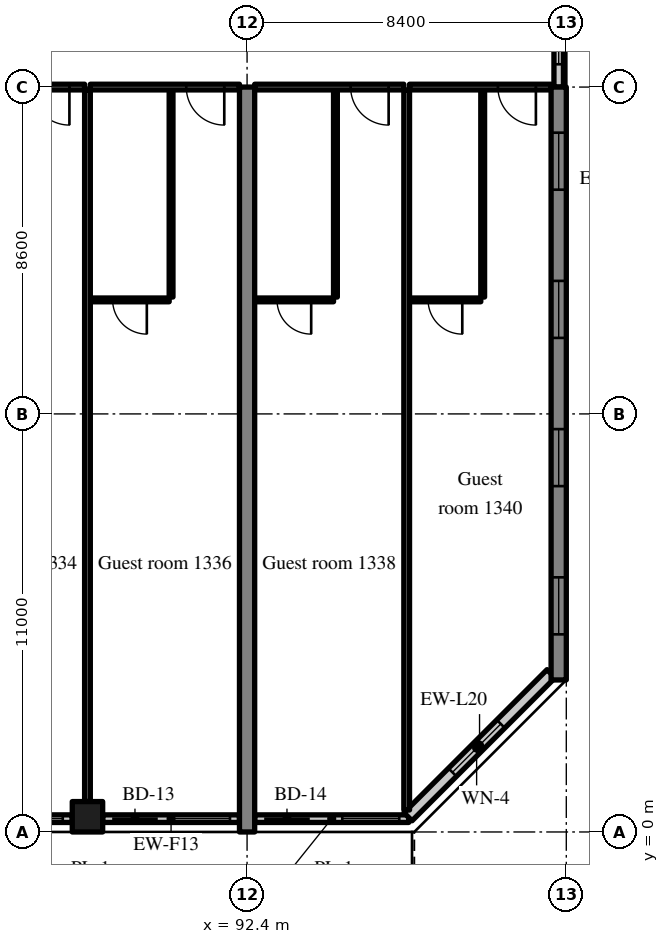
"""IFC4 building model, lengths in metres.
Left out: names, types, materials, properties, quantities, classifications, styles, units other than length and angle.
Written with IfcOpenShell. Run it as: python <this file> out.ifc"""

import sys

from ifc_helpers import new_model, si_unit, direction, frame, frame_2d, origin, origin_2d, place, context, subcontext, project, spatial, rectangle, extrude, source, transform, mapped, element, fill, save


model = new_model("IFC4")
c1 = context("Model", 3, precision=1e-05, world=origin(), true_north=direction((0.0, 1.0)))
c2 = subcontext(c1, "Body", "Model", "MODEL_VIEW")
j1 = project(units=[si_unit("LENGTHUNIT", "METRE"), si_unit("PLANEANGLEUNIT", "RADIAN")], contexts=[c1])
p1 = place(None, origin())
s1 = spatial("IfcSite", under=j1, at=p1, CompositionType="ELEMENT")
p2 = place(p1, origin())
s2 = spatial("IfcBuilding", under=s1, at=p2, CompositionType="ELEMENT")
p3 = place(p2, frame((0.0, 0.0, 58.2)))
s3 = spatial("IfcBuildingStorey", under=s2, at=p3, CompositionType="ELEMENT", Elevation=58.2)
m1 = source(origin(), c2, "Body", "SweptSolid", [
    extrude(rectangle(XDim=19.6, YDim=0.4, at=frame_2d((9.8, 0.0))), origin(), (0.0, 0.0, 1.0), 3.52),
])
p4 = place(p3, frame((92.4, 0.0, 0.0), z_axis=(0.0, 0.0, 1.0), x_axis=(0.0, 1.0, 0.0)))
e1 = element("IfcWall", 1, at=p4, inside=s3, PredefinedType="SHEAR", context=c2, shape_type="MappedRepresentation", body=[
    mapped(m1, transform((0.0, 0.0, 0.0), scale=1.0)),
])
m2 = source(origin(), c2, "Body", "SweptSolid", [
    extrude(rectangle(XDim=15.6, YDim=0.4, at=frame_2d((7.8, 0.0))), origin(), (0.0, 0.0, 1.0), 3.52),
])
p5 = place(p3, frame((100.6, 4.0, 0.0), z_axis=(0.0, 0.0, 1.0), x_axis=(0.0, 1.0, 0.0)))
e2 = element("IfcWall", 2, at=p5, inside=s3, PredefinedType="SHEAR", context=c2, shape_type="MappedRepresentation", body=[
    mapped(m2, transform((0.0, 0.0, 0.0), scale=1.0)),
])
m3 = source(origin(), c2, "Body", "SweptSolid", [
    extrude(rectangle(XDim=1.5, YDim=1.5, at=frame_2d((0.75, 0.75))), frame((0.0, 0.21, 0.0), z_axis=(0.0, -1.0, 0.0), x_axis=(1.0, 0.0, 0.0)), (0.0, 0.0, 1.0), 0.42),
])
p6 = place(p5, frame((1.2, 0.0, 0.9)))
e3 = element("IfcOpeningElement", 3, at=p6, cuts=e2, PredefinedType="OPENING", context=c2, shape_type="MappedRepresentation", body=[
    mapped(m3, transform((0.0, 0.0, 0.0), scale=1.0)),
])
p7 = place(p5, frame((5.1, 0.0, 0.9)))
e4 = element("IfcOpeningElement", 4, at=p7, cuts=e2, PredefinedType="OPENING", context=c2, shape_type="MappedRepresentation", body=[
    mapped(m3, transform((0.0, 0.0, 0.0), scale=1.0)),
])
p8 = place(p5, frame((9.0, 0.0, 0.9)))
e5 = element("IfcOpeningElement", 5, at=p8, cuts=e2, PredefinedType="OPENING", context=c2, shape_type="MappedRepresentation", body=[
    mapped(m3, transform((0.0, 0.0, 0.0), scale=1.0)),
])
p9 = place(p5, frame((12.9, 0.0, 0.9)))
e6 = element("IfcOpeningElement", 6, at=p9, cuts=e2, PredefinedType="OPENING", context=c2, shape_type="MappedRepresentation", body=[
    mapped(m3, transform((0.0, 0.0, 0.0), scale=1.0)),
])
m4 = source(origin(), c2, "Body", "SweptSolid", [
    extrude(rectangle(XDim=0.8, YDim=0.8, at=origin_2d()), origin(), (0.0, 0.0, 1.0), 3.52),
])
p10 = place(p3, frame((88.2, 0.4, 0.0), z_axis=(0.0, 0.0, 1.0), x_axis=(1.0, 0.0, 0.0)))
e7 = element("IfcColumn", 7, at=p10, inside=s3, PredefinedType="COLUMN", context=c2, shape_type="MappedRepresentation", body=[
    mapped(m4, transform((0.0, 0.0, 0.0), scale=1.0)),
])
m5 = source(origin(), c2, "Body", "SweptSolid", [
    extrude(rectangle(XDim=3.6, YDim=0.2, at=frame_2d((1.8, 0.0))), origin(), (0.0, 0.0, 1.0), 2.82),
])
p11 = place(p3, frame((84.2, 0.35, 0.0), z_axis=(0.0, 0.0, 1.0), x_axis=(1.0, 0.0, 0.0)))
e8 = element("IfcWall", 8, at=p11, inside=s3, PredefinedType="SOLIDWALL", context=c2, shape_type="MappedRepresentation", body=[
    mapped(m5, transform((0.0, 0.0, 0.0), scale=1.0)),
])
m6 = source(origin(), c2, "Body", "SweptSolid", [
    extrude(rectangle(XDim=1.2, YDim=2.4, at=frame_2d((0.6, 1.2))), frame((0.0, 0.11, 0.0), z_axis=(0.0, -1.0, 0.0), x_axis=(1.0, 0.0, 0.0)), (0.0, 0.0, 1.0), 0.22),
])
p12 = place(p11, frame((0.25, 0.0, 0.0)))
e9 = element("IfcOpeningElement", 9, at=p12, cuts=e8, PredefinedType="OPENING", context=c2, shape_type="MappedRepresentation", body=[
    mapped(m6, transform((0.0, 0.0, 0.0), scale=1.0)),
])
m7 = source(origin(), c2, "Body", "SweptSolid", [
    extrude(rectangle(XDim=1.5, YDim=1.5, at=frame_2d((0.75, 0.75))), frame((0.0, 0.11, 0.0), z_axis=(0.0, -1.0, 0.0), x_axis=(1.0, 0.0, 0.0)), (0.0, 0.0, 1.0), 0.22),
])
p13 = place(p11, frame((1.85, 0.0, 0.9)))
e10 = element("IfcOpeningElement", 10, at=p13, cuts=e8, PredefinedType="OPENING", context=c2, shape_type="MappedRepresentation", body=[
    mapped(m7, transform((0.0, 0.0, 0.0), scale=1.0)),
])
m8 = source(origin(), c2, "Body", "SweptSolid", [
    extrude(rectangle(XDim=3.6, YDim=0.2, at=frame_2d((1.8, 0.0))), origin(), (0.0, 0.0, 1.0), 2.82),
])
p14 = place(p3, frame((88.6, 0.35, 0.0), z_axis=(0.0, 0.0, 1.0), x_axis=(1.0, 0.0, 0.0)))
e11 = element("IfcWall", 11, at=p14, inside=s3, PredefinedType="SOLIDWALL", context=c2, shape_type="MappedRepresentation", body=[
    mapped(m8, transform((0.0, 0.0, 0.0), scale=1.0)),
])
p15 = place(p14, frame((0.25, 0.0, 0.0)))
e12 = element("IfcOpeningElement", 12, at=p15, cuts=e11, PredefinedType="OPENING", context=c2, shape_type="MappedRepresentation", body=[
    mapped(m6, transform((0.0, 0.0, 0.0), scale=1.0)),
])
p16 = place(p14, frame((1.85, 0.0, 0.9)))
e13 = element("IfcOpeningElement", 13, at=p16, cuts=e11, PredefinedType="OPENING", context=c2, shape_type="MappedRepresentation", body=[
    mapped(m7, transform((0.0, 0.0, 0.0), scale=1.0)),
])
m9 = source(origin(), c2, "Body", "SweptSolid", [
    extrude(rectangle(XDim=4.055, YDim=0.2, at=frame_2d((2.027, 0.0))), origin(), (0.0, 0.0, 1.0), 2.82),
])
p17 = place(p3, frame((92.6, 0.35, 0.0), z_axis=(0.0, 0.0, 1.0), x_axis=(1.0, 0.0, 0.0)))
e14 = element("IfcWall", 14, at=p17, inside=s3, PredefinedType="SOLIDWALL", context=c2, shape_type="MappedRepresentation", body=[
    mapped(m9, transform((0.0, 0.0, 0.0), scale=1.0)),
])
p18 = place(p17, frame((0.25, 0.0, 0.0)))
e15 = element("IfcOpeningElement", 15, at=p18, cuts=e14, PredefinedType="OPENING", context=c2, shape_type="MappedRepresentation", body=[
    mapped(m6, transform((0.0, 0.0, 0.0), scale=1.0)),
])
p19 = place(p17, frame((2.305, 0.0, 0.9)))
e16 = element("IfcOpeningElement", 16, at=p19, cuts=e14, PredefinedType="OPENING", context=c2, shape_type="MappedRepresentation", body=[
    mapped(m7, transform((0.0, 0.0, 0.0), scale=1.0)),
])
m10 = source(origin(), c2, "Body", "SweptSolid", [
    extrude(rectangle(XDim=5.326, YDim=0.3, at=frame_2d((2.663, 0.0))), origin(), (0.0, 0.0, 1.0), 3.52),
])
p20 = place(p3, frame((96.634, 0.4, 0.0), z_axis=(0.0, 0.0, 1.0), x_axis=(0.707083859269, 0.707129702361, 0.0)))
e17 = element("IfcWall", 17, at=p20, inside=s3, PredefinedType="SOLIDWALL", context=c2, shape_type="MappedRepresentation", body=[
    mapped(m10, transform((0.0, 0.0, 0.0), scale=1.0)),
])
m11 = source(origin(), c2, "Body", "SweptSolid", [
    extrude(rectangle(XDim=1.8, YDim=1.5, at=frame_2d((0.9, 0.75))), frame((0.0, 0.16, 0.0), z_axis=(0.0, -1.0, 0.0), x_axis=(1.0, 0.0, 0.0)), (0.0, 0.0, 1.0), 0.32),
])
p21 = place(p20, frame((1.654, 0.0, 0.9)))
e18 = element("IfcOpeningElement", 18, at=p21, cuts=e17, PredefinedType="OPENING", context=c2, shape_type="MappedRepresentation", body=[
    mapped(m11, transform((0.0, 0.0, 0.0), scale=1.0)),
])
m12 = source(origin(), c2, "Body", "SweptSolid", [
    extrude(rectangle(XDim=2.4, YDim=0.25, at=frame_2d((1.2, 0.0))), origin(), (0.0, 0.0, 1.0), 2.62),
])
p22 = place(p3, frame((100.6, 19.6, 0.0), z_axis=(0.0, 0.0, 1.0), x_axis=(0.0, 1.0, 0.0)))
e19 = element("IfcWall", 19, at=p22, inside=s3, PredefinedType="SOLIDWALL", context=c2, shape_type="MappedRepresentation", body=[
    mapped(m12, transform((0.0, 0.0, 0.0), scale=1.0)),
])
m13 = source(origin(), c2, "Body", "SweptSolid", [
    extrude(rectangle(XDim=1.2, YDim=1.5, at=frame_2d((0.6, 0.75))), frame((0.0, 0.135, 0.0), z_axis=(0.0, -1.0, 0.0), x_axis=(1.0, 0.0, 0.0)), (0.0, 0.0, 1.0), 0.27),
])
p23 = place(p22, frame((0.6, 0.0, 0.9)))
e20 = element("IfcOpeningElement", 20, at=p23, cuts=e19, PredefinedType="OPENING", context=c2, shape_type="MappedRepresentation", body=[
    mapped(m13, transform((0.0, 0.0, 0.0), scale=1.0)),
])
m14 = source(origin(), c2, "Body", "SweptSolid", [
    extrude(rectangle(XDim=3.925, YDim=0.15, at=frame_2d((1.962, 0.0))), origin(), (0.0, 0.0, 1.0), 2.82),
])
p24 = place(p3, frame((84.2, 19.6, 0.0), z_axis=(0.0, 0.0, 1.0), x_axis=(1.0, 0.0, 0.0)))
e21 = element("IfcWall", 21, at=p24, inside=s3, PredefinedType="PARTITIONING", context=c2, shape_type="MappedRepresentation", body=[
    mapped(m14, transform((0.0, 0.0, 0.0), scale=1.0)),
])
m15 = source(origin(), c2, "Body", "SweptSolid", [
    extrude(rectangle(XDim=1.0, YDim=2.1, at=frame_2d((0.5, 1.05))), frame((0.0, 0.085, 0.0), z_axis=(0.0, -1.0, 0.0), x_axis=(1.0, 0.0, 0.0)), (0.0, 0.0, 1.0), 0.17),
])
p25 = place(p24, frame((2.525, 0.0, 0.0)))
e22 = element("IfcOpeningElement", 22, at=p25, cuts=e21, PredefinedType="OPENING", context=c2, shape_type="MappedRepresentation", body=[
    mapped(m15, transform((0.0, 0.0, 0.0), scale=1.0)),
])
m16 = source(origin(), c2, "Body", "SweptSolid", [
    extrude(rectangle(XDim=5.45, YDim=0.1, at=frame_2d((2.725, 0.0))), origin(), (0.0, 0.0, 1.0), 3.52),
])
p26 = place(p3, frame((90.4, 14.075, 0.0), z_axis=(0.0, 0.0, 1.0), x_axis=(0.0, 1.0, 0.0)))
e23 = element("IfcWall", 23, at=p26, inside=s3, PredefinedType="PARTITIONING", context=c2, shape_type="MappedRepresentation", body=[
    mapped(m16, transform((0.0, 0.0, 0.0), scale=1.0)),
])
m17 = source(origin(), c2, "Body", "SweptSolid", [
    extrude(rectangle(XDim=2.075, YDim=0.1, at=frame_2d((1.038, 0.0))), origin(), (0.0, 0.0, 1.0), 3.52),
])
p27 = place(p3, frame((88.275, 14.0, 0.0), z_axis=(0.0, 0.0, 1.0), x_axis=(1.0, 0.0, 0.0)))
e24 = element("IfcWall", 24, at=p27, inside=s3, PredefinedType="PARTITIONING", context=c2, shape_type="MappedRepresentation", body=[
    mapped(m17, transform((0.0, 0.0, 0.0), scale=1.0)),
])
m18 = source(origin(), c2, "Body", "SweptSolid", [
    extrude(rectangle(XDim=0.9, YDim=2.1, at=frame_2d((0.45, 1.05))), frame((0.0, 0.06, 0.0), z_axis=(0.0, -1.0, 0.0), x_axis=(1.0, 0.0, 0.0)), (0.0, 0.0, 1.0), 0.12),
])
p28 = place(p27, frame((0.587, 0.0, 0.0)))
e25 = element("IfcOpeningElement", 25, at=p28, cuts=e24, PredefinedType="OPENING", context=c2, shape_type="MappedRepresentation", body=[
    mapped(m18, transform((0.0, 0.0, 0.0), scale=1.0)),
])
p29 = place(p3, frame((88.275, 19.6, 0.0), z_axis=(0.0, 0.0, 1.0), x_axis=(1.0, 0.0, 0.0)))
e26 = element("IfcWall", 26, at=p29, inside=s3, PredefinedType="PARTITIONING", context=c2, shape_type="MappedRepresentation", body=[
    mapped(m14, transform((0.0, 0.0, 0.0), scale=1.0)),
])
p30 = place(p29, frame((2.525, 0.0, 0.0)))
e27 = element("IfcOpeningElement", 27, at=p30, cuts=e26, PredefinedType="OPENING", context=c2, shape_type="MappedRepresentation", body=[
    mapped(m15, transform((0.0, 0.0, 0.0), scale=1.0)),
])
m19 = source(origin(), c2, "Body", "SweptSolid", [
    extrude(rectangle(XDim=18.725, YDim=0.15, at=frame_2d((9.362, 0.0))), origin(), (0.0, 0.0, 1.0), 3.52),
])
p31 = place(p3, frame((88.2, 0.8, 0.0), z_axis=(0.0, 0.0, 1.0), x_axis=(0.0, 1.0, 0.0)))
e28 = element("IfcWall", 28, at=p31, inside=s3, PredefinedType="PARTITIONING", context=c2, shape_type="MappedRepresentation", body=[
    mapped(m19, transform((0.0, 0.0, 0.0), scale=1.0)),
])
p32 = place(p3, frame((94.725, 14.075, 0.0), z_axis=(0.0, 0.0, 1.0), x_axis=(0.0, 1.0, 0.0)))
e29 = element("IfcWall", 29, at=p32, inside=s3, PredefinedType="PARTITIONING", context=c2, shape_type="MappedRepresentation", body=[
    mapped(m16, transform((0.0, 0.0, 0.0), scale=1.0)),
])
m20 = source(origin(), c2, "Body", "SweptSolid", [
    extrude(rectangle(XDim=2.075, YDim=0.1, at=frame_2d((1.038, 0.0))), origin(), (0.0, 0.0, 1.0), 3.52),
])
p33 = place(p3, frame((92.6, 14.0, 0.0), z_axis=(0.0, 0.0, 1.0), x_axis=(1.0, 0.0, 0.0)))
e30 = element("IfcWall", 30, at=p33, inside=s3, PredefinedType="PARTITIONING", context=c2, shape_type="MappedRepresentation", body=[
    mapped(m20, transform((0.0, 0.0, 0.0), scale=1.0)),
])
p34 = place(p33, frame((0.587, 0.0, 0.0)))
e31 = element("IfcOpeningElement", 31, at=p34, cuts=e30, PredefinedType="OPENING", context=c2, shape_type="MappedRepresentation", body=[
    mapped(m18, transform((0.0, 0.0, 0.0), scale=1.0)),
])
m21 = source(origin(), c2, "Body", "SweptSolid", [
    extrude(rectangle(XDim=3.925, YDim=0.15, at=frame_2d((1.962, 0.0))), origin(), (0.0, 0.0, 1.0), 2.82),
])
p35 = place(p3, frame((92.6, 19.6, 0.0), z_axis=(0.0, 0.0, 1.0), x_axis=(1.0, 0.0, 0.0)))
e32 = element("IfcWall", 32, at=p35, inside=s3, PredefinedType="PARTITIONING", context=c2, shape_type="MappedRepresentation", body=[
    mapped(m21, transform((0.0, 0.0, 0.0), scale=1.0)),
])
p36 = place(p35, frame((2.525, 0.0, 0.0)))
e33 = element("IfcOpeningElement", 33, at=p36, cuts=e32, PredefinedType="OPENING", context=c2, shape_type="MappedRepresentation", body=[
    mapped(m15, transform((0.0, 0.0, 0.0), scale=1.0)),
])
p37 = place(p3, frame((98.6, 14.075, 0.0), z_axis=(0.0, 0.0, 1.0), x_axis=(0.0, 1.0, 0.0)))
e34 = element("IfcWall", 34, at=p37, inside=s3, PredefinedType="PARTITIONING", context=c2, shape_type="MappedRepresentation", body=[
    mapped(m16, transform((0.0, 0.0, 0.0), scale=1.0)),
])
m22 = source(origin(), c2, "Body", "SweptSolid", [
    extrude(rectangle(XDim=1.875, YDim=0.1, at=frame_2d((0.938, 0.0))), origin(), (0.0, 0.0, 1.0), 3.52),
])
p38 = place(p3, frame((96.675, 14.0, 0.0), z_axis=(0.0, 0.0, 1.0), x_axis=(1.0, 0.0, 0.0)))
e35 = element("IfcWall", 35, at=p38, inside=s3, PredefinedType="PARTITIONING", context=c2, shape_type="MappedRepresentation", body=[
    mapped(m22, transform((0.0, 0.0, 0.0), scale=1.0)),
])
p39 = place(p38, frame((0.488, 0.0, 0.0)))
e36 = element("IfcOpeningElement", 36, at=p39, cuts=e35, PredefinedType="OPENING", context=c2, shape_type="MappedRepresentation", body=[
    mapped(m18, transform((0.0, 0.0, 0.0), scale=1.0)),
])
m23 = source(origin(), c2, "Body", "SweptSolid", [
    extrude(rectangle(XDim=3.725, YDim=0.15, at=frame_2d((1.862, 0.0))), origin(), (0.0, 0.0, 1.0), 2.82),
])
p40 = place(p3, frame((96.675, 19.6, 0.0), z_axis=(0.0, 0.0, 1.0), x_axis=(1.0, 0.0, 0.0)))
e37 = element("IfcWall", 37, at=p40, inside=s3, PredefinedType="PARTITIONING", context=c2, shape_type="MappedRepresentation", body=[
    mapped(m23, transform((0.0, 0.0, 0.0), scale=1.0)),
])
p41 = place(p40, frame((2.325, 0.0, 0.0)))
e38 = element("IfcOpeningElement", 38, at=p41, cuts=e37, PredefinedType="OPENING", context=c2, shape_type="MappedRepresentation", body=[
    mapped(m15, transform((0.0, 0.0, 0.0), scale=1.0)),
])
m24 = source(origin(), c2, "Body", "SweptSolid", [
    extrude(rectangle(XDim=18.947, YDim=0.15, at=frame_2d((9.474, 0.0))), origin(), (0.0, 0.0, 1.0), 3.52),
])
p42 = place(p3, frame((96.6, 0.578, 0.0), z_axis=(0.0, 0.0, 1.0), x_axis=(0.0, 1.0, 0.0)))
e39 = element("IfcWall", 39, at=p42, inside=s3, PredefinedType="PARTITIONING", context=c2, shape_type="MappedRepresentation", body=[
    mapped(m24, transform((0.0, 0.0, 0.0), scale=1.0)),
])
m25 = source(origin(), c2, "Body", "SweptSolid", [
    extrude(rectangle(XDim=1.5, YDim=1.5, at=frame_2d((0.75, 0.75))), frame((0.0, 0.03, 0.0), z_axis=(0.0, -1.0, 0.0), x_axis=(1.0, 0.0, 0.0)), (0.0, 0.0, 1.0), 0.06),
])
p43 = place(p13, origin())
e40 = element("IfcWindow", 40, at=p43, inside=s3, PartitioningType="SINGLE_PANEL", PredefinedType="WINDOW", context=c2, shape_type="MappedRepresentation", body=[
    mapped(m25, transform((0.0, 0.0, 0.0), scale=1.0)),
])
fill(e10, e40)
m26 = source(origin(), c2, "Body", "SweptSolid", [
    extrude(rectangle(XDim=1.2, YDim=2.4, at=frame_2d((0.6, 1.2))), frame((0.0, 0.025, 0.0), z_axis=(0.0, -1.0, 0.0), x_axis=(1.0, 0.0, 0.0)), (0.0, 0.0, 1.0), 0.05),
])
p44 = place(p15, origin())
e41 = element("IfcDoor", 41, at=p44, inside=s3, OperationType="SLIDING_TO_LEFT", PredefinedType="DOOR", context=c2, shape_type="MappedRepresentation", body=[
    mapped(m26, transform((0.0, 0.0, 0.0), scale=1.0)),
])
fill(e12, e41)
p45 = place(p16, origin())
e42 = element("IfcWindow", 42, at=p45, inside=s3, PartitioningType="SINGLE_PANEL", PredefinedType="WINDOW", context=c2, shape_type="MappedRepresentation", body=[
    mapped(m25, transform((0.0, 0.0, 0.0), scale=1.0)),
])
fill(e13, e42)
p46 = place(p18, origin())
e43 = element("IfcDoor", 43, at=p46, inside=s3, OperationType="SLIDING_TO_RIGHT", PredefinedType="DOOR", context=c2, shape_type="MappedRepresentation", body=[
    mapped(m26, transform((0.0, 0.0, 0.0), scale=1.0)),
])
fill(e15, e43)
p47 = place(p19, origin())
e44 = element("IfcWindow", 44, at=p47, inside=s3, PartitioningType="SINGLE_PANEL", PredefinedType="WINDOW", context=c2, shape_type="MappedRepresentation", body=[
    mapped(m25, transform((0.0, 0.0, 0.0), scale=1.0)),
])
fill(e16, e44)
m27 = source(origin(), c2, "Body", "SweptSolid", [
    extrude(rectangle(XDim=1.8, YDim=1.5, at=frame_2d((0.9, 0.75))), frame((0.0, 0.03, 0.0), z_axis=(0.0, -1.0, 0.0), x_axis=(1.0, 0.0, 0.0)), (0.0, 0.0, 1.0), 0.06),
])
p48 = place(p21, origin())
e45 = element("IfcWindow", 45, at=p48, inside=s3, PartitioningType="SINGLE_PANEL", PredefinedType="WINDOW", context=c2, shape_type="MappedRepresentation", body=[
    mapped(m27, transform((0.0, 0.0, 0.0), scale=1.0)),
])
fill(e18, e45)
p49 = place(p6, origin())
e46 = element("IfcWindow", 46, at=p49, inside=s3, PartitioningType="SINGLE_PANEL", PredefinedType="WINDOW", context=c2, shape_type="MappedRepresentation", body=[
    mapped(m25, transform((0.0, 0.0, 0.0), scale=1.0)),
])
fill(e3, e46)
p50 = place(p7, origin())
e47 = element("IfcWindow", 47, at=p50, inside=s3, PartitioningType="SINGLE_PANEL", PredefinedType="WINDOW", context=c2, shape_type="MappedRepresentation", body=[
    mapped(m25, transform((0.0, 0.0, 0.0), scale=1.0)),
])
fill(e4, e47)
p51 = place(p8, origin())
e48 = element("IfcWindow", 48, at=p51, inside=s3, PartitioningType="SINGLE_PANEL", PredefinedType="WINDOW", context=c2, shape_type="MappedRepresentation", body=[
    mapped(m25, transform((0.0, 0.0, 0.0), scale=1.0)),
])
fill(e5, e48)
p52 = place(p9, origin())
e49 = element("IfcWindow", 49, at=p52, inside=s3, PartitioningType="SINGLE_PANEL", PredefinedType="WINDOW", context=c2, shape_type="MappedRepresentation", body=[
    mapped(m25, transform((0.0, 0.0, 0.0), scale=1.0)),
])
fill(e6, e49)
m28 = source(origin(), c2, "Body", "SweptSolid", [
    extrude(rectangle(XDim=1.2, YDim=1.5, at=frame_2d((0.6, 0.75))), frame((0.0, 0.03, 0.0), z_axis=(0.0, -1.0, 0.0), x_axis=(1.0, 0.0, 0.0)), (0.0, 0.0, 1.0), 0.06),
])
p53 = place(p23, origin())
e50 = element("IfcWindow", 50, at=p53, inside=s3, PartitioningType="SINGLE_PANEL", PredefinedType="WINDOW", context=c2, shape_type="MappedRepresentation", body=[
    mapped(m28, transform((0.0, 0.0, 0.0), scale=1.0)),
])
fill(e20, e50)
m29 = source(origin(), c2, "Body", "SweptSolid", [
    extrude(rectangle(XDim=1.0, YDim=2.1, at=frame_2d((0.5, 1.05))), frame((0.0, 0.025, 0.0), z_axis=(0.0, -1.0, 0.0), x_axis=(1.0, 0.0, 0.0)), (0.0, 0.0, 1.0), 0.05),
])
p54 = place(p25, origin())
e51 = element("IfcDoor", 51, at=p54, inside=s3, OperationType="SINGLE_SWING_RIGHT", PredefinedType="DOOR", context=c2, shape_type="MappedRepresentation", body=[
    mapped(m29, transform((0.0, 0.0, 0.0), scale=1.0)),
])
fill(e22, e51)
m30 = source(origin(), c2, "Body", "SweptSolid", [
    extrude(rectangle(XDim=0.9, YDim=2.1, at=frame_2d((0.45, 1.05))), frame((0.0, 0.025, 0.0), z_axis=(0.0, -1.0, 0.0), x_axis=(1.0, 0.0, 0.0)), (0.0, 0.0, 1.0), 0.05),
])
p55 = place(p28, origin())
e52 = element("IfcDoor", 52, at=p55, inside=s3, OperationType="SINGLE_SWING_RIGHT", PredefinedType="DOOR", context=c2, shape_type="MappedRepresentation", body=[
    mapped(m30, transform((0.0, 0.0, 0.0), scale=1.0)),
])
fill(e25, e52)
p56 = place(p30, origin())
e53 = element("IfcDoor", 53, at=p56, inside=s3, OperationType="SINGLE_SWING_RIGHT", PredefinedType="DOOR", context=c2, shape_type="MappedRepresentation", body=[
    mapped(m29, transform((0.0, 0.0, 0.0), scale=1.0)),
])
fill(e27, e53)
p57 = place(p34, origin())
e54 = element("IfcDoor", 54, at=p57, inside=s3, OperationType="SINGLE_SWING_RIGHT", PredefinedType="DOOR", context=c2, shape_type="MappedRepresentation", body=[
    mapped(m30, transform((0.0, 0.0, 0.0), scale=1.0)),
])
fill(e31, e54)
p58 = place(p36, origin())
e55 = element("IfcDoor", 55, at=p58, inside=s3, OperationType="SINGLE_SWING_RIGHT", PredefinedType="DOOR", context=c2, shape_type="MappedRepresentation", body=[
    mapped(m29, transform((0.0, 0.0, 0.0), scale=1.0)),
])
fill(e33, e55)
p59 = place(p39, origin())
e56 = element("IfcDoor", 56, at=p59, inside=s3, OperationType="SINGLE_SWING_RIGHT", PredefinedType="DOOR", context=c2, shape_type="MappedRepresentation", body=[
    mapped(m30, transform((0.0, 0.0, 0.0), scale=1.0)),
])
fill(e36, e56)
p60 = place(p41, origin())
e57 = element("IfcDoor", 57, at=p60, inside=s3, OperationType="SINGLE_SWING_RIGHT", PredefinedType="DOOR", context=c2, shape_type="MappedRepresentation", body=[
    mapped(m29, transform((0.0, 0.0, 0.0), scale=1.0)),
])
fill(e38, e57)
save(model, sys.argv[1])
